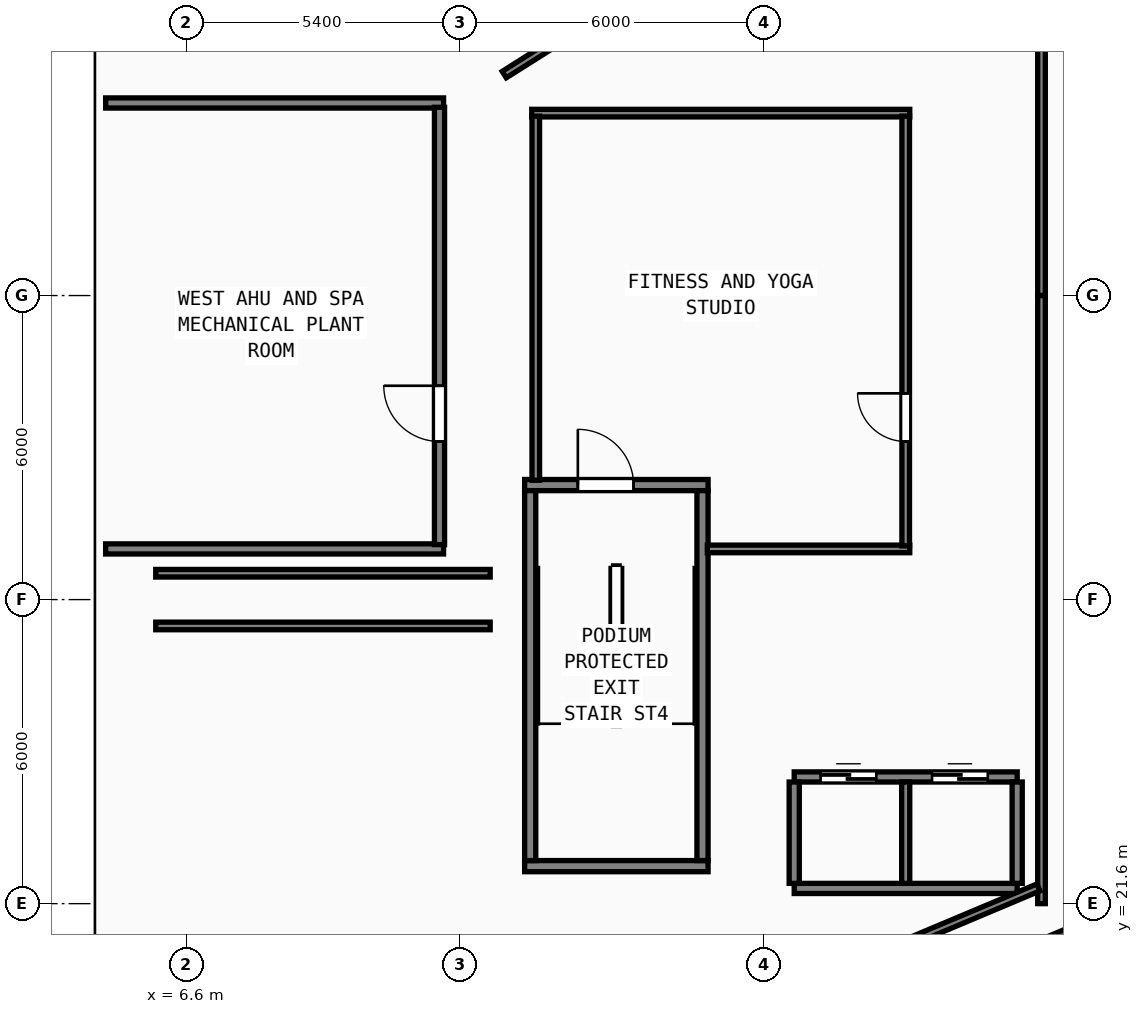
"""IFC4 building model, lengths in metres.
Left out: names, types, materials, properties, quantities, classifications, styles, units other than length and angle.
Written with IfcOpenShell. Run it as: python <this file> out.ifc"""

import sys

from ifc_helpers import new_model, si_unit, direction, frame, frame_2d, origin, origin_2d, place, context, subcontext, project, spatial, rectangle, hollow_rectangle, extrude, element, fill, save


model = new_model("IFC4")
c1 = context("Model", 3, precision=1e-05, world=origin(), true_north=direction((0.0, 1.0)))
c2 = subcontext(c1, "Body", "Model", "MODEL_VIEW")
j1 = project(units=[si_unit("LENGTHUNIT", "METRE"), si_unit("PLANEANGLEUNIT", "RADIAN")], contexts=[c1])
p1 = place(None, origin())
s1 = spatial("IfcSite", under=j1, at=p1, CompositionType="ELEMENT")
p2 = place(p1, origin())
s2 = spatial("IfcBuilding", under=s1, at=p2, CompositionType="ELEMENT")
p3 = place(p2, frame((0.0, 0.0, 19.8)))
s3 = spatial("IfcBuildingStorey", under=s2, at=p3, CompositionType="ELEMENT", Elevation=19.8)
p4 = place(p3, frame((13.28, 29.86, 0.0), z_axis=(0.0, 0.0, 1.0), x_axis=(1.0, 0.0, 0.0)))
e1 = element("IfcWall", 1, at=p4, inside=s3, PredefinedType="SHEAR", context=c2, shape_type="SweptSolid", body=[
    extrude(rectangle(XDim=3.62, YDim=0.22, at=frame_2d((1.81, 0.0))), origin(), (0.0, 0.0, 1.0), 4.0),
])
p5 = place(p4, frame((1.05, 0.0, 0.0)))
e2 = element("IfcOpeningElement", 2, at=p5, cuts=e1, PredefinedType="OPENING", context=c2, shape_type="SweptSolid", body=[
    extrude(rectangle(XDim=1.1, YDim=2.15, at=frame_2d((0.55, 1.075))), frame((0.0, 0.12, 0.0), z_axis=(0.0, -1.0, 0.0), x_axis=(1.0, 0.0, 0.0)), (0.0, 0.0, 1.0), 0.24),
])
p6 = place(p3, frame((13.28, 22.34, 0.0), z_axis=(0.0, 0.0, 1.0), x_axis=(1.0, 0.0, 0.0)))
e3 = element("IfcWall", 3, at=p6, inside=s3, PredefinedType="SHEAR", context=c2, shape_type="SweptSolid", body=[
    extrude(rectangle(XDim=3.62, YDim=0.22, at=frame_2d((1.81, 0.0))), origin(), (0.0, 0.0, 1.0), 4.0),
])
for number, where, z_axis, x_axis in (
    (4, (13.39, 22.45, 0.0), (0.0, 0.0, 1.0), (0.0, 1.0, 0.0)),
    (5, (16.79, 22.45, 0.0), (0.0, 0.0, 1.0), (0.0, 1.0, 0.0)),
):
    element("IfcWall", number, at=place(p3, frame(where, z_axis=z_axis, x_axis=x_axis)), inside=s3, PredefinedType="SHEAR", context=c2, shape_type="SweptSolid", body=[
        extrude(rectangle(XDim=7.3, YDim=0.22, at=frame_2d((3.65, 0.0))), origin(), (0.0, 0.0, 1.0), 4.0),
    ])
for number, where, z_axis, x_axis in (
    (6, (24.0, 21.6, 0.0), (0.0, 0.0, 1.0), (1.0, 0.0, 0.0)),
    (7, (24.0, 33.6, 0.0), (0.0, 0.0, 1.0), (1.0, 0.0, 0.0)),
    (8, (12.6, 27.6, 0.0), (0.0, 0.0, 1.0), (1.0, 0.0, 0.0)),
    (9, (12.6, 38.4, 0.0), (0.0, 0.0, 1.0), (1.0, 0.0, 0.0)),
):
    element("IfcColumn", number, at=place(p3, frame(where, z_axis=z_axis, x_axis=x_axis)), inside=s3, PredefinedType="COLUMN", context=c2, shape_type="SweptSolid", body=[
        extrude(hollow_rectangle(XDim=1.3, YDim=1.3, WallThickness=0.048, at=origin_2d()), origin(), (0.0, 0.0, 1.0), 4.2),
    ])
p7 = place(p3, frame((6.0, 27.6, 0.0), z_axis=(0.0, 0.0, 1.0), x_axis=(1.0, 0.0, 0.0)))
e10 = element("IfcColumn", 10, at=p7, inside=s3, PredefinedType="COLUMN", context=c2, shape_type="SweptSolid", body=[
    extrude(hollow_rectangle(XDim=1.15, YDim=1.15, WallThickness=0.042, at=origin_2d()), origin(), (0.0, 0.0, 1.0), 4.2),
])
p8 = place(p3, frame((18.6, 24.1, 0.0), z_axis=(0.0, 0.0, 1.0), x_axis=(1.0, 0.0, 0.0)))
e11 = element("IfcWall", 11, at=p8, inside=s3, PredefinedType="SOLIDWALL", context=c2, shape_type="SweptSolid", body=[
    extrude(rectangle(XDim=4.4, YDim=0.2, at=frame_2d((2.2, 0.0))), origin(), (0.0, 0.0, 1.0), 4.0),
])
p9 = place(p8, frame((0.52, 0.0, 0.0)))
e12 = element("IfcOpeningElement", 12, at=p9, cuts=e11, PredefinedType="OPENING", context=c2, shape_type="SweptSolid", body=[
    extrude(rectangle(XDim=1.1, YDim=2.2, at=frame_2d((0.55, 1.1))), frame((0.0, 0.11, 0.0), z_axis=(0.0, -1.0, 0.0), x_axis=(1.0, 0.0, 0.0)), (0.0, 0.0, 1.0), 0.22),
])
p10 = place(p8, frame((2.72, 0.0, 0.0)))
e13 = element("IfcOpeningElement", 13, at=p10, cuts=e11, PredefinedType="OPENING", context=c2, shape_type="SweptSolid", body=[
    extrude(rectangle(XDim=1.1, YDim=2.2, at=frame_2d((0.55, 1.1))), frame((0.0, 0.11, 0.0), z_axis=(0.0, -1.0, 0.0), x_axis=(1.0, 0.0, 0.0)), (0.0, 0.0, 1.0), 0.22),
])
p11 = place(p3, frame((18.6, 21.9, 0.0), z_axis=(0.0, 0.0, 1.0), x_axis=(1.0, 0.0, 0.0)))
e14 = element("IfcWall", 14, at=p11, inside=s3, PredefinedType="SOLIDWALL", context=c2, shape_type="SweptSolid", body=[
    extrude(rectangle(XDim=4.4, YDim=0.2, at=frame_2d((2.2, 0.0))), origin(), (0.0, 0.0, 1.0), 4.0),
])
for number, where, z_axis, x_axis in (
    (15, (18.6, 22.0, 0.0), (0.0, 0.0, 1.0), (0.0, 1.0, 0.0)),
    (16, (23.0, 22.0, 0.0), (0.0, 0.0, 1.0), (0.0, 1.0, 0.0)),
):
    element("IfcWall", number, at=place(p3, frame(where, z_axis=z_axis, x_axis=x_axis)), inside=s3, PredefinedType="SOLIDWALL", context=c2, shape_type="SweptSolid", body=[
        extrude(rectangle(XDim=2.0, YDim=0.2, at=frame_2d((1.0, 0.0))), origin(), (0.0, 0.0, 1.0), 4.0),
    ])
p12 = place(p3, frame((20.8, 22.0, 0.0), z_axis=(0.0, 0.0, 1.0), x_axis=(0.0, 1.0, 0.0)))
e17 = element("IfcWall", 17, at=p12, inside=s3, PredefinedType="SOLIDWALL", context=c2, shape_type="SweptSolid", body=[
    extrude(rectangle(XDim=2.0, YDim=0.16, at=frame_2d((1.0, 0.0))), origin(), (0.0, 0.0, 1.0), 4.0),
])
p13 = place(p3, frame((23.48, 21.6, 0.0), z_axis=(0.0, 0.0, 1.0), x_axis=(0.0, 1.0, 0.0)))
e18 = element("IfcWall", 18, at=p13, inside=s3, PredefinedType="PARTITIONING", context=c2, shape_type="SweptSolid", body=[
    extrude(rectangle(XDim=12.0, YDim=0.15, at=frame_2d((6.0, 0.0))), origin(), (0.0, 0.0, 1.0), 4.0),
])
p14 = place(p3, frame((23.48, 33.602, 0.0), z_axis=(0.0, 0.0, 1.0), x_axis=(0.0, 1.0, 0.0)))
e19 = element("IfcWall", 19, at=p14, inside=s3, PredefinedType="PARTITIONING", context=c2, shape_type="SweptSolid", body=[
    extrude(rectangle(XDim=11.998, YDim=0.15, at=frame_2d((5.999, 0.0))), origin(), (0.0, 0.0, 1.0), 4.0),
])
p15 = place(p3, frame((12.802, 16.321, 0.0), z_axis=(0.0, 0.0, 1.0), x_axis=(0.921642805559, 0.388039352335, 0.0)))
e20 = element("IfcWall", 20, at=p15, inside=s3, PredefinedType="PARTITIONING", context=c2, shape_type="SweptSolid", body=[
    extrude(rectangle(XDim=12.369, YDim=0.15, at=frame_2d((6.185, 0.0))), origin(), (0.0, 0.0, 1.0), 4.0),
])
p16 = place(p3, frame((12.398, 17.279, 0.0), z_axis=(0.0, 0.0, 1.0), x_axis=(0.921631147996, 0.388067039368, 0.0)))
e21 = element("IfcWall", 21, at=p16, inside=s3, PredefinedType="PARTITIONING", context=c2, shape_type="SweptSolid", body=[
    extrude(rectangle(XDim=11.959, YDim=0.15, at=frame_2d((5.979, 0.0))), origin(), (0.0, 0.0, 1.0), 4.0),
])
p17 = place(p3, frame((12.878, 37.96, 0.0), z_axis=(0.0, 0.0, 1.0), x_axis=(0.845481923966, 0.534004041415, 0.0)))
e22 = element("IfcWall", 22, at=p17, inside=s3, PredefinedType="PARTITIONING", context=c2, shape_type="SweptSolid", body=[
    extrude(rectangle(XDim=12.469, YDim=0.15, at=frame_2d((6.234, 0.0))), origin(), (0.0, 0.0, 1.0), 4.0),
])
for number, where, z_axis, x_axis in (
    (23, (6.0, 27.08, 0.0), (0.0, 0.0, 1.0), (1.0, 0.0, 0.0)),
    (24, (6.0, 28.12, 0.0), (0.0, 0.0, 1.0), (1.0, 0.0, 0.0)),
):
    element("IfcWall", number, at=place(p3, frame(where, z_axis=z_axis, x_axis=x_axis)), inside=s3, PredefinedType="PARTITIONING", context=c2, shape_type="SweptSolid", body=[
        extrude(rectangle(XDim=6.6, YDim=0.15, at=frame_2d((3.3, 0.0))), origin(), (0.0, 0.0, 1.0), 4.0),
    ])
p18 = place(p3, frame((13.42, 37.2, 0.0), z_axis=(0.0, 0.0, 1.0), x_axis=(1.0, 0.0, 0.0)))
e25 = element("IfcWall", 25, at=p18, inside=s3, PredefinedType="PARTITIONING", context=c2, shape_type="SweptSolid", body=[
    extrude(rectangle(XDim=7.46, YDim=0.15, at=frame_2d((3.73, 0.0))), origin(), (0.0, 0.0, 1.0), 4.0),
])
p19 = place(p3, frame((16.885, 28.6, 0.0), z_axis=(0.0, 0.0, 1.0), x_axis=(1.0, 0.0, 0.0)))
e26 = element("IfcWall", 26, at=p19, inside=s3, PredefinedType="PARTITIONING", context=c2, shape_type="SweptSolid", body=[
    extrude(rectangle(XDim=3.995, YDim=0.15, at=frame_2d((1.998, 0.0))), origin(), (0.0, 0.0, 1.0), 4.0),
])
p20 = place(p3, frame((13.5, 29.955, 0.0), z_axis=(0.0, 0.0, 1.0), x_axis=(0.0, 1.0, 0.0)))
e27 = element("IfcWall", 27, at=p20, inside=s3, PredefinedType="PARTITIONING", context=c2, shape_type="SweptSolid", body=[
    extrude(rectangle(XDim=7.185, YDim=0.15, at=frame_2d((3.592, 0.0))), origin(), (0.0, 0.0, 1.0), 4.0),
])
p21 = place(p3, frame((20.8, 28.66, 0.0), z_axis=(0.0, 0.0, 1.0), x_axis=(0.0, 1.0, 0.0)))
e28 = element("IfcWall", 28, at=p21, inside=s3, PredefinedType="PARTITIONING", context=c2, shape_type="SweptSolid", body=[
    extrude(rectangle(XDim=8.48, YDim=0.15, at=frame_2d((4.24, 0.0))), origin(), (0.0, 0.0, 1.0), 4.0),
])
p22 = place(p21, frame((3.01, 0.0, 0.0), z_axis=(0.0, 0.0, 1.0), x_axis=(-1.0, 0.0, 0.0)))
e29 = element("IfcOpeningElement", 29, at=p22, cuts=e28, PredefinedType="OPENING", context=c2, shape_type="SweptSolid", body=[
    extrude(rectangle(XDim=0.95, YDim=2.12, at=frame_2d((0.475, 1.06))), frame((0.0, 0.085, 0.0), z_axis=(0.0, -1.0, 0.0), x_axis=(1.0, 0.0, 0.0)), (0.0, 0.0, 1.0), 0.17),
])
for number, where, z_axis, x_axis in (
    (30, (5.012, 37.4, 0.0), (0.0, 0.0, 1.0), (1.0, 0.0, 0.0)),
    (31, (5.012, 28.6, 0.0), (0.0, 0.0, 1.0), (1.0, 0.0, 0.0)),
):
    element("IfcWall", number, at=place(p3, frame(where, z_axis=z_axis, x_axis=x_axis)), inside=s3, PredefinedType="SOLIDWALL", context=c2, shape_type="SweptSolid", body=[
        extrude(rectangle(XDim=6.668, YDim=0.2, at=frame_2d((3.334, 0.0))), origin(), (0.0, 0.0, 1.0), 4.0),
    ])
p23 = place(p3, frame((11.6, 28.685, 0.0), z_axis=(0.0, 0.0, 1.0), x_axis=(0.0, 1.0, 0.0)))
e32 = element("IfcWall", 32, at=p23, inside=s3, PredefinedType="SOLIDWALL", context=c2, shape_type="SweptSolid", body=[
    extrude(rectangle(XDim=8.63, YDim=0.2, at=frame_2d((4.315, 0.0))), origin(), (0.0, 0.0, 1.0), 4.0),
])
p24 = place(p23, frame((3.135, 0.0, 0.0), z_axis=(0.0, 0.0, 1.0), x_axis=(-1.0, 0.0, 0.0)))
e33 = element("IfcOpeningElement", 33, at=p24, cuts=e32, PredefinedType="OPENING", context=c2, shape_type="SweptSolid", body=[
    extrude(rectangle(XDim=1.1, YDim=2.15, at=frame_2d((0.55, 1.075))), frame((0.0, 0.11, 0.0), z_axis=(0.0, -1.0, 0.0), x_axis=(1.0, 0.0, 0.0)), (0.0, 0.0, 1.0), 0.22),
])
p25 = place(p5, origin())
e34 = element("IfcDoor", 34, at=p25, inside=s3, OperationType="SINGLE_SWING_LEFT", PredefinedType="DOOR", context=c2, shape_type="SweptSolid", body=[
    extrude(rectangle(XDim=1.1, YDim=2.15, at=frame_2d((0.55, 1.075))), frame((0.0, 0.025, 0.0), z_axis=(0.0, -1.0, 0.0), x_axis=(1.0, 0.0, 0.0)), (0.0, 0.0, 1.0), 0.05),
])
fill(e2, e34)
p26 = place(p9, origin())
e35 = element("IfcDoor", 35, at=p26, inside=s3, OperationType="SLIDING_TO_LEFT", PredefinedType="DOOR", context=c2, shape_type="SweptSolid", body=[
    extrude(rectangle(XDim=1.1, YDim=2.2, at=frame_2d((0.55, 1.1))), frame((0.0, 0.025, 0.0), z_axis=(0.0, -1.0, 0.0), x_axis=(1.0, 0.0, 0.0)), (0.0, 0.0, 1.0), 0.05),
])
fill(e12, e35)
p27 = place(p10, origin())
e36 = element("IfcDoor", 36, at=p27, inside=s3, OperationType="SLIDING_TO_LEFT", PredefinedType="DOOR", context=c2, shape_type="SweptSolid", body=[
    extrude(rectangle(XDim=1.1, YDim=2.2, at=frame_2d((0.55, 1.1))), frame((0.0, 0.025, 0.0), z_axis=(0.0, -1.0, 0.0), x_axis=(1.0, 0.0, 0.0)), (0.0, 0.0, 1.0), 0.05),
])
fill(e13, e36)
p28 = place(p22, origin())
e37 = element("IfcDoor", 37, at=p28, inside=s3, OperationType="SINGLE_SWING_LEFT", PredefinedType="DOOR", context=c2, shape_type="SweptSolid", body=[
    extrude(rectangle(XDim=0.95, YDim=2.12, at=frame_2d((0.475, 1.06))), frame((0.0, 0.025, 0.0), z_axis=(0.0, -1.0, 0.0), x_axis=(1.0, 0.0, 0.0)), (0.0, 0.0, 1.0), 0.05),
])
fill(e29, e37)
p29 = place(p24, origin())
e38 = element("IfcDoor", 38, at=p29, inside=s3, OperationType="SINGLE_SWING_LEFT", PredefinedType="DOOR", context=c2, shape_type="SweptSolid", body=[
    extrude(rectangle(XDim=1.1, YDim=2.15, at=frame_2d((0.55, 1.075))), frame((0.0, 0.025, 0.0), z_axis=(0.0, -1.0, 0.0), x_axis=(1.0, 0.0, 0.0)), (0.0, 0.0, 1.0), 0.05),
])
fill(e33, e38)
save(model, sys.argv[1])
